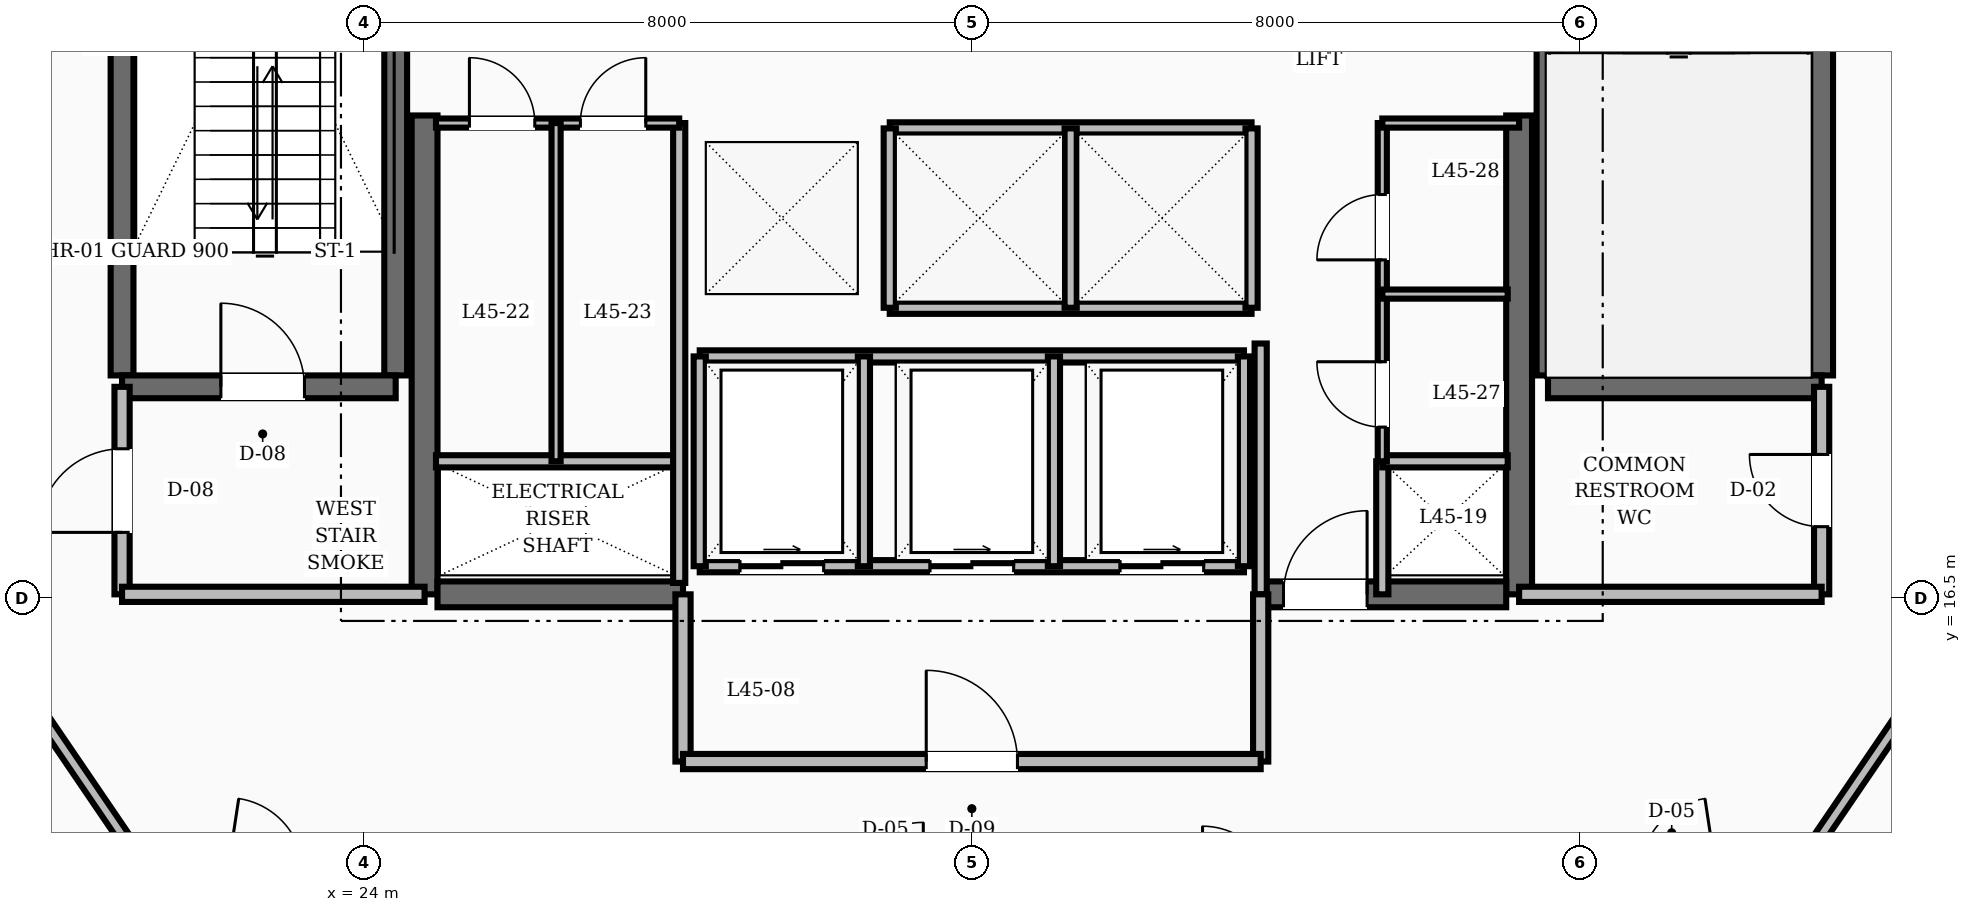
"""IFC4 building model, lengths in metres.
Left out: names, types, materials, properties, quantities, classifications, styles, units other than length and angle.
Written with IfcOpenShell. Run it as: python <this file> out.ifc"""

import sys

from ifc_helpers import new_model, si_unit, direction, frame, frame_2d, origin, place, context, subcontext, project, spatial, rectangle, extrude, element, fill, save


model = new_model("IFC4")
c1 = context("Model", 3, precision=1e-05, world=origin(), true_north=direction((0.0, 1.0)))
c2 = subcontext(c1, "Body", "Model", "MODEL_VIEW")
j1 = project(units=[si_unit("LENGTHUNIT", "METRE"), si_unit("PLANEANGLEUNIT", "RADIAN")], contexts=[c1])
p1 = place(None, origin())
s1 = spatial("IfcSite", under=j1, at=p1, CompositionType="ELEMENT")
p2 = place(p1, origin())
s2 = spatial("IfcBuilding", under=s1, at=p2, CompositionType="ELEMENT")
p3 = place(p2, frame((0.0, 0.0, 174.8)))
s3 = spatial("IfcBuildingStorey", under=s2, at=p3, CompositionType="ELEMENT", Elevation=174.8)
for number, where, z_axis, x_axis in (
    (1, (24.8, 16.55, 0.0), (0.0, 0.0, 1.0), (0.0, 1.0, 0.0)),
    (2, (39.2, 16.55, 0.0), (0.0, 0.0, 1.0), (0.0, 1.0, 0.0)),
):
    element("IfcWall", number, at=place(p3, frame(where, z_axis=z_axis, x_axis=x_axis)), inside=s3, PredefinedType="SHEAR", context=c2, shape_type="SweptSolid", body=[
        extrude(rectangle(XDim=6.3, YDim=0.34, at=frame_2d((3.15, 0.0))), origin(), (0.0, 0.0, 1.0), 3.6),
    ])
p4 = place(p3, frame((24.97, 16.55, 0.0), z_axis=(0.0, 0.0, 1.0), x_axis=(1.0, 0.0, 0.0)))
e3 = element("IfcWall", 3, at=p4, inside=s3, PredefinedType="SHEAR", context=c2, shape_type="SweptSolid", body=[
    extrude(rectangle(XDim=3.23, YDim=0.34, at=frame_2d((1.615, 0.0))), origin(), (0.0, 0.0, 1.0), 3.6),
])
p5 = place(p3, frame((35.8, 16.55, 0.0), z_axis=(0.0, 0.0, 1.0), x_axis=(1.0, 0.0, 0.0)))
e4 = element("IfcWall", 4, at=p5, inside=s3, PredefinedType="SHEAR", context=c2, shape_type="SweptSolid", body=[
    extrude(rectangle(XDim=3.23, YDim=0.34, at=frame_2d((1.615, 0.0))), origin(), (0.0, 0.0, 1.0), 3.6),
])
p6 = place(p5, frame((0.3, 0.0, 0.0)))
e5 = element("IfcOpeningElement", 5, at=p6, cuts=e4, PredefinedType="OPENING", context=c2, shape_type="SweptSolid", body=[
    extrude(rectangle(XDim=1.1, YDim=2.1, at=frame_2d((0.55, 1.05))), frame((0.0, 0.18, 0.0), z_axis=(0.0, -1.0, 0.0), x_axis=(1.0, 0.0, 0.0)), (0.0, 0.0, 1.0), 0.36),
])
for number, where, z_axis, x_axis in (
    (6, (20.82, 19.43, 0.0), (0.0, 0.0, 1.0), (0.0, 1.0, 0.0)),
    (7, (24.42, 19.43, 0.0), (0.0, 0.0, 1.0), (0.0, 1.0, 0.0)),
):
    element("IfcWall", number, at=place(p3, frame(where, z_axis=z_axis, x_axis=x_axis)), inside=s3, PredefinedType="SHEAR", context=c2, shape_type="SweptSolid", body=[
        extrude(rectangle(XDim=8.74, YDim=0.3, at=frame_2d((4.37, 0.0))), origin(), (0.0, 0.0, 1.0), 3.6),
    ])
p7 = place(p3, frame((20.82, 19.28, 0.0), z_axis=(0.0, 0.0, 1.0), x_axis=(1.0, 0.0, 0.0)))
e8 = element("IfcWall", 8, at=p7, inside=s3, PredefinedType="SHEAR", context=c2, shape_type="SweptSolid", body=[
    extrude(rectangle(XDim=3.6, YDim=0.3, at=frame_2d((1.8, 0.0))), origin(), (0.0, 0.0, 1.0), 3.6),
])
p8 = place(p7, frame((1.3, 0.0, 0.0)))
e9 = element("IfcOpeningElement", 9, at=p8, cuts=e8, PredefinedType="OPENING", context=c2, shape_type="SweptSolid", body=[
    extrude(rectangle(XDim=1.1, YDim=2.1, at=frame_2d((0.55, 1.05))), frame((0.0, 0.16, 0.0), z_axis=(0.0, -1.0, 0.0), x_axis=(1.0, 0.0, 0.0)), (0.0, 0.0, 1.0), 0.32),
])
for number, where, z_axis, x_axis in (
    (10, (43.18, 19.43, 0.0), (0.0, 0.0, 1.0), (0.0, 1.0, 0.0)),
    (11, (39.58, 19.43, 0.0), (0.0, 0.0, 1.0), (0.0, 1.0, 0.0)),
):
    element("IfcWall", number, at=place(p3, frame(where, z_axis=z_axis, x_axis=x_axis)), inside=s3, PredefinedType="SHEAR", context=c2, shape_type="SweptSolid", body=[
        extrude(rectangle(XDim=8.74, YDim=0.3, at=frame_2d((4.37, 0.0))), origin(), (0.0, 0.0, 1.0), 3.6),
    ])
p9 = place(p3, frame((39.58, 19.28, 0.0), z_axis=(0.0, 0.0, 1.0), x_axis=(1.0, 0.0, 0.0)))
e12 = element("IfcWall", 12, at=p9, inside=s3, PredefinedType="SHEAR", context=c2, shape_type="SweptSolid", body=[
    extrude(rectangle(XDim=3.6, YDim=0.3, at=frame_2d((1.8, 0.0))), origin(), (0.0, 0.0, 1.0), 3.6),
])
p10 = place(p3, frame((20.82, 16.55, 0.0), z_axis=(0.0, 0.0, 1.0), x_axis=(0.0, 1.0, 0.0)))
e13 = element("IfcWall", 13, at=p10, inside=s3, PredefinedType="SOLIDWALL", context=c2, shape_type="SweptSolid", body=[
    extrude(rectangle(XDim=2.73, YDim=0.2, at=frame_2d((1.365, 0.0))), origin(), (0.0, 0.0, 1.0), 2.8),
])
p11 = place(p10, frame((0.815, 0.0, 0.0)))
e14 = element("IfcOpeningElement", 14, at=p11, cuts=e13, PredefinedType="OPENING", context=c2, shape_type="SweptSolid", body=[
    extrude(rectangle(XDim=1.1, YDim=2.1, at=frame_2d((0.55, 1.05))), frame((0.0, 0.11, 0.0), z_axis=(0.0, -1.0, 0.0), x_axis=(1.0, 0.0, 0.0)), (0.0, 0.0, 1.0), 0.22),
])
p12 = place(p3, frame((20.82, 16.55, 0.0), z_axis=(0.0, 0.0, 1.0), x_axis=(1.0, 0.0, 0.0)))
e15 = element("IfcWall", 15, at=p12, inside=s3, PredefinedType="SOLIDWALL", context=c2, shape_type="SweptSolid", body=[
    extrude(rectangle(XDim=3.98, YDim=0.2, at=frame_2d((1.99, 0.0))), origin(), (0.0, 0.0, 1.0), 2.8),
])
p13 = place(p3, frame((43.18, 16.55, 0.0), z_axis=(0.0, 0.0, 1.0), x_axis=(0.0, 1.0, 0.0)))
e16 = element("IfcWall", 16, at=p13, inside=s3, PredefinedType="SOLIDWALL", context=c2, shape_type="SweptSolid", body=[
    extrude(rectangle(XDim=2.73, YDim=0.2, at=frame_2d((1.365, 0.0))), origin(), (0.0, 0.0, 1.0), 2.8),
])
p14 = place(p13, frame((0.89, 0.0, 0.0)))
e17 = element("IfcOpeningElement", 17, at=p14, cuts=e16, PredefinedType="OPENING", context=c2, shape_type="SweptSolid", body=[
    extrude(rectangle(XDim=0.95, YDim=2.1, at=frame_2d((0.475, 1.05))), frame((0.0, 0.11, 0.0), z_axis=(0.0, -1.0, 0.0), x_axis=(1.0, 0.0, 0.0)), (0.0, 0.0, 1.0), 0.22),
])
p15 = place(p3, frame((39.2, 16.55, 0.0), z_axis=(0.0, 0.0, 1.0), x_axis=(1.0, 0.0, 0.0)))
e18 = element("IfcWall", 18, at=p15, inside=s3, PredefinedType="SOLIDWALL", context=c2, shape_type="SweptSolid", body=[
    extrude(rectangle(XDim=3.98, YDim=0.2, at=frame_2d((1.99, 0.0))), origin(), (0.0, 0.0, 1.0), 2.8),
])
p16 = place(p3, frame((35.8, 16.55, 0.0), z_axis=(0.0, 0.0, 1.0), x_axis=(0.0, 1.0, 0.0)))
e19 = element("IfcWall", 19, at=p16, inside=s3, PredefinedType="SOLIDWALL", context=c2, shape_type="SweptSolid", body=[
    extrude(rectangle(XDim=3.3, YDim=0.16, at=frame_2d((1.65, 0.0))), origin(), (0.0, 0.0, 1.0), 2.8),
])
p17 = place(p3, frame((37.4, 16.55, 0.0), z_axis=(0.0, 0.0, 1.0), x_axis=(0.0, 1.0, 0.0)))
e20 = element("IfcWall", 20, at=p17, inside=s3, PredefinedType="SOLIDWALL", context=c2, shape_type="SweptSolid", body=[
    extrude(rectangle(XDim=1.75, YDim=0.16, at=frame_2d((0.875, 0.0))), origin(), (0.0, 0.0, 1.0), 2.8),
])
for number, where, z_axis, x_axis in (
    (21, (28.2, 14.35, 0.0), (0.0, 0.0, 1.0), (0.0, 1.0, 0.0)),
    (22, (35.8, 14.35, 0.0), (0.0, 0.0, 1.0), (0.0, 1.0, 0.0)),
):
    element("IfcWall", number, at=place(p3, frame(where, z_axis=z_axis, x_axis=x_axis)), inside=s3, PredefinedType="SOLIDWALL", context=c2, shape_type="SweptSolid", body=[
        extrude(rectangle(XDim=2.2, YDim=0.2, at=frame_2d((1.1, 0.0))), origin(), (0.0, 0.0, 1.0), 2.8),
    ])
p18 = place(p3, frame((28.2, 14.35, 0.0), z_axis=(0.0, 0.0, 1.0), x_axis=(1.0, 0.0, 0.0)))
e23 = element("IfcWall", 23, at=p18, inside=s3, PredefinedType="SOLIDWALL", context=c2, shape_type="SweptSolid", body=[
    extrude(rectangle(XDim=7.6, YDim=0.2, at=frame_2d((3.8, 0.0))), origin(), (0.0, 0.0, 1.0), 2.8),
])
p19 = place(p18, frame((3.2, 0.0, 0.0)))
e24 = element("IfcOpeningElement", 24, at=p19, cuts=e23, PredefinedType="OPENING", context=c2, shape_type="SweptSolid", body=[
    extrude(rectangle(XDim=1.2, YDim=2.1, at=frame_2d((0.6, 1.05))), frame((0.0, 0.11, 0.0), z_axis=(0.0, -1.0, 0.0), x_axis=(1.0, 0.0, 0.0)), (0.0, 0.0, 1.0), 0.22),
])
for number, where, z_axis, x_axis in (
    (25, (30.92, 22.68, 0.0), (0.0, 0.0, 1.0), (1.0, 0.0, 0.0)),
    (26, (30.92, 20.32, 0.0), (0.0, 0.0, 1.0), (1.0, 0.0, 0.0)),
):
    element("IfcWall", number, at=place(p3, frame(where, z_axis=z_axis, x_axis=x_axis)), inside=s3, PredefinedType="SOLIDWALL", context=c2, shape_type="SweptSolid", body=[
        extrude(rectangle(XDim=4.76, YDim=0.16, at=frame_2d((2.38, 0.0))), origin(), (0.0, 0.0, 1.0), 2.8),
    ])
for number, where, z_axis, x_axis in (
    (27, (30.92, 20.32, 0.0), (0.0, 0.0, 1.0), (0.0, 1.0, 0.0)),
    (28, (33.3, 20.32, 0.0), (0.0, 0.0, 1.0), (0.0, 1.0, 0.0)),
    (29, (35.68, 20.32, 0.0), (0.0, 0.0, 1.0), (0.0, 1.0, 0.0)),
):
    element("IfcWall", number, at=place(p3, frame(where, z_axis=z_axis, x_axis=x_axis)), inside=s3, PredefinedType="SOLIDWALL", context=c2, shape_type="SweptSolid", body=[
        extrude(rectangle(XDim=2.36, YDim=0.16, at=frame_2d((1.18, 0.0))), origin(), (0.0, 0.0, 1.0), 2.8),
    ])
p20 = place(p3, frame((28.42, 16.92, 0.0), z_axis=(0.0, 0.0, 1.0), x_axis=(1.0, 0.0, 0.0)))
e30 = element("IfcWall", 30, at=p20, inside=s3, PredefinedType="SOLIDWALL", context=c2, shape_type="SweptSolid", body=[
    extrude(rectangle(XDim=7.16, YDim=0.16, at=frame_2d((3.58, 0.0))), origin(), (0.0, 0.0, 1.0), 2.8),
])
p21 = place(p20, frame((0.53, 0.0, 0.0)))
e31 = element("IfcOpeningElement", 31, at=p21, cuts=e30, PredefinedType="OPENING", context=c2, shape_type="SweptSolid", body=[
    extrude(rectangle(XDim=1.1, YDim=2.15, at=frame_2d((0.55, 1.075))), frame((0.0, 0.09, 0.0), z_axis=(0.0, -1.0, 0.0), x_axis=(1.0, 0.0, 0.0)), (0.0, 0.0, 1.0), 0.18),
])
p22 = place(p20, frame((3.03, 0.0, 0.0)))
e32 = element("IfcOpeningElement", 32, at=p22, cuts=e30, PredefinedType="OPENING", context=c2, shape_type="SweptSolid", body=[
    extrude(rectangle(XDim=1.1, YDim=2.15, at=frame_2d((0.55, 1.075))), frame((0.0, 0.09, 0.0), z_axis=(0.0, -1.0, 0.0), x_axis=(1.0, 0.0, 0.0)), (0.0, 0.0, 1.0), 0.18),
])
p23 = place(p20, frame((5.53, 0.0, 0.0)))
e33 = element("IfcOpeningElement", 33, at=p23, cuts=e30, PredefinedType="OPENING", context=c2, shape_type="SweptSolid", body=[
    extrude(rectangle(XDim=1.1, YDim=2.15, at=frame_2d((0.55, 1.075))), frame((0.0, 0.09, 0.0), z_axis=(0.0, -1.0, 0.0), x_axis=(1.0, 0.0, 0.0)), (0.0, 0.0, 1.0), 0.18),
])
p24 = place(p3, frame((28.42, 19.68, 0.0), z_axis=(0.0, 0.0, 1.0), x_axis=(1.0, 0.0, 0.0)))
e34 = element("IfcWall", 34, at=p24, inside=s3, PredefinedType="SOLIDWALL", context=c2, shape_type="SweptSolid", body=[
    extrude(rectangle(XDim=7.16, YDim=0.16, at=frame_2d((3.58, 0.0))), origin(), (0.0, 0.0, 1.0), 2.8),
])
for number, where, z_axis, x_axis in (
    (35, (28.42, 16.92, 0.0), (0.0, 0.0, 1.0), (0.0, 1.0, 0.0)),
    (36, (30.58, 16.92, 0.0), (0.0, 0.0, 1.0), (0.0, 1.0, 0.0)),
    (37, (33.08, 16.92, 0.0), (0.0, 0.0, 1.0), (0.0, 1.0, 0.0)),
    (38, (35.58, 16.92, 0.0), (0.0, 0.0, 1.0), (0.0, 1.0, 0.0)),
):
    element("IfcWall", number, at=place(p3, frame(where, z_axis=z_axis, x_axis=x_axis)), inside=s3, PredefinedType="SOLIDWALL", context=c2, shape_type="SweptSolid", body=[
        extrude(rectangle(XDim=2.76, YDim=0.16, at=frame_2d((1.38, 0.0))), origin(), (0.0, 0.0, 1.0), 2.8),
    ])
p25 = place(p3, frame((24.95, 18.3, 0.0), z_axis=(0.0, 0.0, 1.0), x_axis=(1.0, 0.0, 0.0)))
e39 = element("IfcWall", 39, at=p25, inside=s3, PredefinedType="SOLIDWALL", context=c2, shape_type="SweptSolid", body=[
    extrude(rectangle(XDim=3.2, YDim=0.16, at=frame_2d((1.6, 0.0))), origin(), (0.0, 0.0, 1.0), 2.8),
])
p26 = place(p3, frame((28.15, 16.7, 0.0), z_axis=(0.0, 0.0, 1.0), x_axis=(0.0, 1.0, 0.0)))
e40 = element("IfcWall", 40, at=p26, inside=s3, PredefinedType="SOLIDWALL", context=c2, shape_type="SweptSolid", body=[
    extrude(rectangle(XDim=6.05, YDim=0.16, at=frame_2d((3.025, 0.0))), origin(), (0.0, 0.0, 1.0), 2.8),
])
p27 = place(p3, frame((37.4, 18.3, 0.0), z_axis=(0.0, 0.0, 1.0), x_axis=(1.0, 0.0, 0.0)))
e41 = element("IfcWall", 41, at=p27, inside=s3, PredefinedType="SOLIDWALL", context=c2, shape_type="SweptSolid", body=[
    extrude(rectangle(XDim=1.65, YDim=0.16, at=frame_2d((0.825, 0.0))), origin(), (0.0, 0.0, 1.0), 2.8),
])
p28 = place(p3, frame((24.95, 22.75, 0.0), z_axis=(0.0, 0.0, 1.0), x_axis=(1.0, 0.0, 0.0)))
e42 = element("IfcWall", 42, at=p28, inside=s3, PredefinedType="PARTITIONING", context=c2, shape_type="SweptSolid", body=[
    extrude(rectangle(XDim=3.2, YDim=0.12, at=frame_2d((1.6, 0.0))), origin(), (0.0, 0.0, 1.0), 2.8),
])
p29 = place(p28, frame((0.44, 0.0, 0.0)))
e43 = element("IfcOpeningElement", 43, at=p29, cuts=e42, PredefinedType="OPENING", context=c2, shape_type="SweptSolid", body=[
    extrude(rectangle(XDim=0.86, YDim=2.1, at=frame_2d((0.43, 1.05))), frame((0.0, 0.07, 0.0), z_axis=(0.0, -1.0, 0.0), x_axis=(1.0, 0.0, 0.0)), (0.0, 0.0, 1.0), 0.14),
])
p30 = place(p28, frame((1.9, 0.0, 0.0)))
e44 = element("IfcOpeningElement", 44, at=p30, cuts=e42, PredefinedType="OPENING", context=c2, shape_type="SweptSolid", body=[
    extrude(rectangle(XDim=0.86, YDim=2.1, at=frame_2d((0.43, 1.05))), frame((0.0, 0.07, 0.0), z_axis=(0.0, -1.0, 0.0), x_axis=(1.0, 0.0, 0.0)), (0.0, 0.0, 1.0), 0.14),
])
p31 = place(p3, frame((37.4, 18.3, 0.0), z_axis=(0.0, 0.0, 1.0), x_axis=(0.0, 1.0, 0.0)))
e45 = element("IfcWall", 45, at=p31, inside=s3, PredefinedType="PARTITIONING", context=c2, shape_type="SweptSolid", body=[
    extrude(rectangle(XDim=4.45, YDim=0.12, at=frame_2d((2.225, 0.0))), origin(), (0.0, 0.0, 1.0), 2.8),
])
p32 = place(p31, frame((0.45, 0.0, 0.0)))
e46 = element("IfcOpeningElement", 46, at=p32, cuts=e45, PredefinedType="OPENING", context=c2, shape_type="SweptSolid", body=[
    extrude(rectangle(XDim=0.86, YDim=2.1, at=frame_2d((0.43, 1.05))), frame((0.0, 0.07, 0.0), z_axis=(0.0, -1.0, 0.0), x_axis=(1.0, 0.0, 0.0)), (0.0, 0.0, 1.0), 0.14),
])
p33 = place(p31, frame((2.65, 0.0, 0.0)))
e47 = element("IfcOpeningElement", 47, at=p33, cuts=e45, PredefinedType="OPENING", context=c2, shape_type="SweptSolid", body=[
    extrude(rectangle(XDim=0.86, YDim=2.1, at=frame_2d((0.43, 1.05))), frame((0.0, 0.07, 0.0), z_axis=(0.0, -1.0, 0.0), x_axis=(1.0, 0.0, 0.0)), (0.0, 0.0, 1.0), 0.14),
])
p34 = place(p3, frame((37.4, 22.75, 0.0), z_axis=(0.0, 0.0, 1.0), x_axis=(1.0, 0.0, 0.0)))
e48 = element("IfcWall", 48, at=p34, inside=s3, PredefinedType="PARTITIONING", context=c2, shape_type="SweptSolid", body=[
    extrude(rectangle(XDim=1.8, YDim=0.12, at=frame_2d((0.9, 0.0))), origin(), (0.0, 0.0, 1.0), 2.8),
])
p35 = place(p3, frame((26.53, 18.3, 0.0), z_axis=(0.0, 0.0, 1.0), x_axis=(0.0, 1.0, 0.0)))
e49 = element("IfcWall", 49, at=p35, inside=s3, PredefinedType="PARTITIONING", context=c2, shape_type="SweptSolid", body=[
    extrude(rectangle(XDim=4.45, YDim=0.12, at=frame_2d((2.225, 0.0))), origin(), (0.0, 0.0, 1.0), 2.8),
])
p36 = place(p3, frame((37.4, 20.5, 0.0), z_axis=(0.0, 0.0, 1.0), x_axis=(1.0, 0.0, 0.0)))
e50 = element("IfcWall", 50, at=p36, inside=s3, PredefinedType="PARTITIONING", context=c2, shape_type="SweptSolid", body=[
    extrude(rectangle(XDim=1.65, YDim=0.12, at=frame_2d((0.825, 0.0))), origin(), (0.0, 0.0, 1.0), 2.8),
])
for number, where, z_axis, x_axis in (
    (51, (19.35, 15.548, 0.0), (0.0, 0.0, 1.0), (0.563, -0.827, 0.0)),
    (52, (42.95, 13.05, 0.0), (0.0, 0.0, 1.0), (0.563, 0.827, 0.0)),
):
    element("IfcWall", number, at=place(p3, frame(where, z_axis=z_axis, x_axis=x_axis)), inside=s3, PredefinedType="SOLIDWALL", context=c2, shape_type="SweptSolid", body=[
        extrude(rectangle(XDim=3.021, YDim=0.16, at=frame_2d((1.511, 0.0))), origin(), (0.0, 0.0, 1.0), 2.8),
    ])
p37 = place(p8, origin())
e53 = element("IfcDoor", 53, at=p37, inside=s3, OperationType="SINGLE_SWING_LEFT", PredefinedType="DOOR", context=c2, shape_type="SweptSolid", body=[
    extrude(rectangle(XDim=1.1, YDim=2.1, at=frame_2d((0.55, 1.05))), frame((0.0, 0.025, 0.0), z_axis=(0.0, -1.0, 0.0), x_axis=(1.0, 0.0, 0.0)), (0.0, 0.0, 1.0), 0.05),
])
fill(e9, e53)
p38 = place(p11, origin())
e54 = element("IfcDoor", 54, at=p38, inside=s3, OperationType="SINGLE_SWING_LEFT", PredefinedType="DOOR", context=c2, shape_type="SweptSolid", body=[
    extrude(rectangle(XDim=1.1, YDim=2.1, at=frame_2d((0.55, 1.05))), frame((0.0, 0.025, 0.0), z_axis=(0.0, -1.0, 0.0), x_axis=(1.0, 0.0, 0.0)), (0.0, 0.0, 1.0), 0.05),
])
fill(e14, e54)
p39 = place(p14, origin())
e55 = element("IfcDoor", 55, at=p39, inside=s3, OperationType="SINGLE_SWING_RIGHT", PredefinedType="DOOR", context=c2, shape_type="SweptSolid", body=[
    extrude(rectangle(XDim=0.95, YDim=2.1, at=frame_2d((0.475, 1.05))), frame((0.0, 0.025, 0.0), z_axis=(0.0, -1.0, 0.0), x_axis=(1.0, 0.0, 0.0)), (0.0, 0.0, 1.0), 0.05),
])
fill(e17, e55)
p40 = place(p6, origin())
e56 = element("IfcDoor", 56, at=p40, inside=s3, OperationType="SINGLE_SWING_RIGHT", PredefinedType="DOOR", context=c2, shape_type="SweptSolid", body=[
    extrude(rectangle(XDim=1.1, YDim=2.1, at=frame_2d((0.55, 1.05))), frame((0.0, 0.025, 0.0), z_axis=(0.0, -1.0, 0.0), x_axis=(1.0, 0.0, 0.0)), (0.0, 0.0, 1.0), 0.05),
])
fill(e5, e56)
p41 = place(p19, origin())
e57 = element("IfcDoor", 57, at=p41, inside=s3, OperationType="SINGLE_SWING_LEFT", PredefinedType="DOOR", context=c2, shape_type="SweptSolid", body=[
    extrude(rectangle(XDim=1.2, YDim=2.1, at=frame_2d((0.6, 1.05))), frame((0.0, 0.025, 0.0), z_axis=(0.0, -1.0, 0.0), x_axis=(1.0, 0.0, 0.0)), (0.0, 0.0, 1.0), 0.05),
])
fill(e24, e57)
p42 = place(p21, origin())
e58 = element("IfcDoor", 58, at=p42, inside=s3, OperationType="SLIDING_TO_RIGHT", PredefinedType="DOOR", context=c2, shape_type="SweptSolid", body=[
    extrude(rectangle(XDim=1.1, YDim=2.15, at=frame_2d((0.55, 1.075))), frame((0.0, 0.025, 0.0), z_axis=(0.0, -1.0, 0.0), x_axis=(1.0, 0.0, 0.0)), (0.0, 0.0, 1.0), 0.05),
])
fill(e31, e58)
p43 = place(p22, origin())
e59 = element("IfcDoor", 59, at=p43, inside=s3, OperationType="SLIDING_TO_RIGHT", PredefinedType="DOOR", context=c2, shape_type="SweptSolid", body=[
    extrude(rectangle(XDim=1.1, YDim=2.15, at=frame_2d((0.55, 1.075))), frame((0.0, 0.025, 0.0), z_axis=(0.0, -1.0, 0.0), x_axis=(1.0, 0.0, 0.0)), (0.0, 0.0, 1.0), 0.05),
])
fill(e32, e59)
p44 = place(p23, origin())
e60 = element("IfcDoor", 60, at=p44, inside=s3, OperationType="SLIDING_TO_RIGHT", PredefinedType="DOOR", context=c2, shape_type="SweptSolid", body=[
    extrude(rectangle(XDim=1.1, YDim=2.15, at=frame_2d((0.55, 1.075))), frame((0.0, 0.025, 0.0), z_axis=(0.0, -1.0, 0.0), x_axis=(1.0, 0.0, 0.0)), (0.0, 0.0, 1.0), 0.05),
])
fill(e33, e60)
p45 = place(p29, origin())
e61 = element("IfcDoor", 61, at=p45, inside=s3, OperationType="SINGLE_SWING_LEFT", PredefinedType="DOOR", context=c2, shape_type="SweptSolid", body=[
    extrude(rectangle(XDim=0.86, YDim=2.1, at=frame_2d((0.43, 1.05))), frame((0.0, 0.025, 0.0), z_axis=(0.0, -1.0, 0.0), x_axis=(1.0, 0.0, 0.0)), (0.0, 0.0, 1.0), 0.05),
])
fill(e43, e61)
p46 = place(p30, origin())
e62 = element("IfcDoor", 62, at=p46, inside=s3, OperationType="SINGLE_SWING_RIGHT", PredefinedType="DOOR", context=c2, shape_type="SweptSolid", body=[
    extrude(rectangle(XDim=0.86, YDim=2.1, at=frame_2d((0.43, 1.05))), frame((0.0, 0.025, 0.0), z_axis=(0.0, -1.0, 0.0), x_axis=(1.0, 0.0, 0.0)), (0.0, 0.0, 1.0), 0.05),
])
fill(e44, e62)
p47 = place(p32, origin())
e63 = element("IfcDoor", 63, at=p47, inside=s3, OperationType="SINGLE_SWING_RIGHT", PredefinedType="DOOR", context=c2, shape_type="SweptSolid", body=[
    extrude(rectangle(XDim=0.86, YDim=2.1, at=frame_2d((0.43, 1.05))), frame((0.0, 0.025, 0.0), z_axis=(0.0, -1.0, 0.0), x_axis=(1.0, 0.0, 0.0)), (0.0, 0.0, 1.0), 0.05),
])
fill(e46, e63)
p48 = place(p33, origin())
e64 = element("IfcDoor", 64, at=p48, inside=s3, OperationType="SINGLE_SWING_LEFT", PredefinedType="DOOR", context=c2, shape_type="SweptSolid", body=[
    extrude(rectangle(XDim=0.86, YDim=2.1, at=frame_2d((0.43, 1.05))), frame((0.0, 0.025, 0.0), z_axis=(0.0, -1.0, 0.0), x_axis=(1.0, 0.0, 0.0)), (0.0, 0.0, 1.0), 0.05),
])
fill(e47, e64)
save(model, sys.argv[1])
